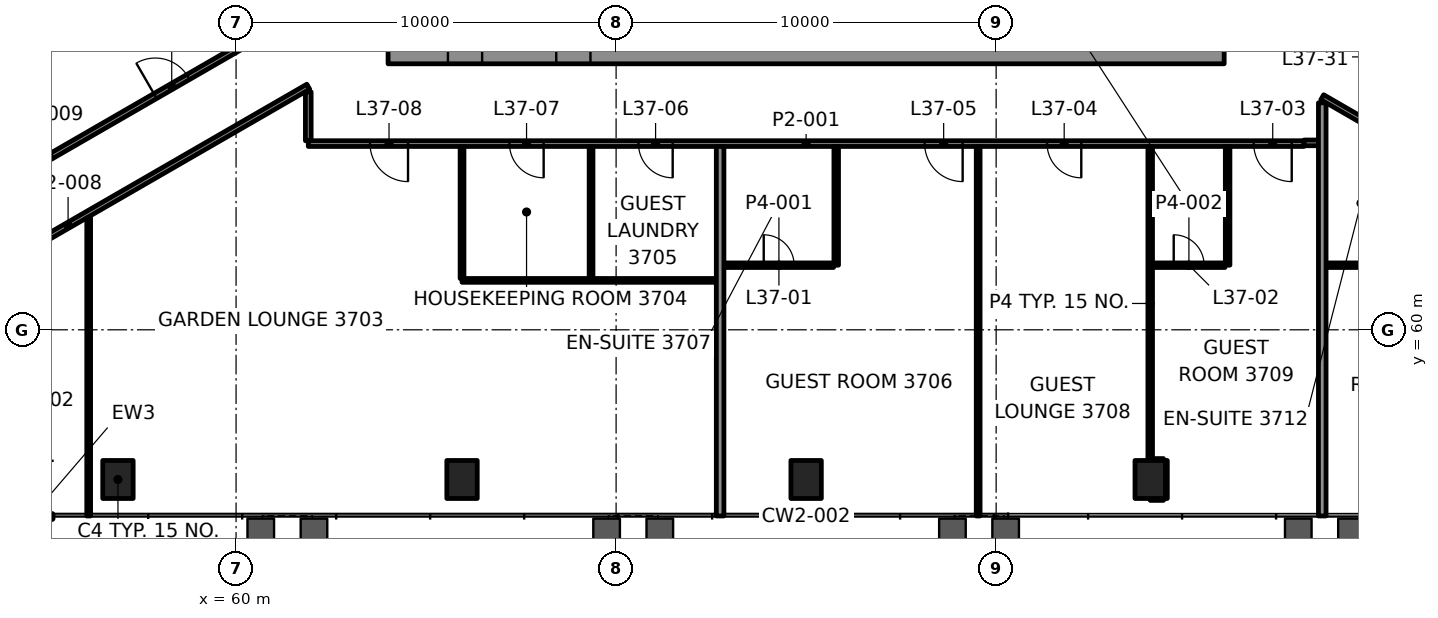
"""IFC4 building model, lengths in metres.
Left out: names, types, materials, properties, quantities, classifications, styles, units other than length and angle.
Written with IfcOpenShell. Run it as: python <this file> out.ifc"""

import sys

from ifc_helpers import new_model, si_unit, direction, frame, frame_2d, origin, origin_2d, place, context, subcontext, project, spatial, rectangle, hollow_rectangle, extrude, element, fill, save


model = new_model("IFC4")
c1 = context("Model", 3, precision=1e-05, world=origin(), true_north=direction((0.0, 1.0)))
c2 = subcontext(c1, "Body", "Model", "MODEL_VIEW")
j1 = project(units=[si_unit("LENGTHUNIT", "METRE"), si_unit("PLANEANGLEUNIT", "RADIAN")], contexts=[c1])
p1 = place(None, origin())
s1 = spatial("IfcSite", under=j1, at=p1, CompositionType="ELEMENT")
p2 = place(p1, origin())
s2 = spatial("IfcBuilding", under=s1, at=p2, CompositionType="ELEMENT")
p3 = place(p2, frame((0.0, 0.0, 163.6)))
s3 = spatial("IfcBuildingStorey", under=s2, at=p3, CompositionType="ELEMENT", Elevation=163.6)
for number, where, z_axis, x_axis in (
    (1, (56.892, 56.061, -0.0), (0.0, 0.0, 1.0), (1.0, 0.0, 0.0)),
    (2, (65.946, 56.061, -0.0), (0.0, 0.0, 1.0), (1.0, 0.0, 0.0)),
    (3, (75.0, 56.061, -0.0), (0.0, 0.0, 1.0), (1.0, 0.0, 0.0)),
    (4, (84.054, 56.061, -0.0), (0.0, 0.0, 1.0), (1.0, 0.0, 0.0)),
):
    element("IfcColumn", number, at=place(p3, frame(where, z_axis=z_axis, x_axis=x_axis)), inside=s3, PredefinedType="COLUMN", context=c2, shape_type="SweptSolid", body=[
        extrude(hollow_rectangle(XDim=0.8, YDim=1.0, WallThickness=0.05, at=origin_2d()), origin(), (0.0, 0.0, 1.0), 3.9),
    ])
p4 = place(p3, frame((64.0, 67.375, 0.0), z_axis=(0.0, 0.0, 1.0), x_axis=(1.0, 0.0, 0.0)))
e5 = element("IfcWall", 5, at=p4, inside=s3, PredefinedType="SHEAR", context=c2, shape_type="SweptSolid", body=[
    extrude(rectangle(XDim=22.0, YDim=0.75, at=frame_2d((11.0, 0.0))), origin(), (0.0, 0.0, 1.0), 3.7),
])
p5 = place(p4, frame((1.575, 0.0, 0.0)))
e6 = element("IfcOpeningElement", 6, at=p5, cuts=e5, PredefinedType="OPENING", context=c2, shape_type="SweptSolid", body=[
    extrude(rectangle(XDim=0.9, YDim=2.1, at=frame_2d((0.45, 1.05))), frame((0.0, 0.385, 0.0), z_axis=(0.0, -1.0, 0.0), x_axis=(1.0, 0.0, 0.0)), (0.0, 0.0, 1.0), 0.77),
])
p6 = place(p4, frame((4.425, 0.0, 0.0)))
e7 = element("IfcOpeningElement", 7, at=p6, cuts=e5, PredefinedType="OPENING", context=c2, shape_type="SweptSolid", body=[
    extrude(rectangle(XDim=0.9, YDim=2.1, at=frame_2d((0.45, 1.05))), frame((0.0, 0.385, 0.0), z_axis=(0.0, -1.0, 0.0), x_axis=(1.0, 0.0, 0.0)), (0.0, 0.0, 1.0), 0.77),
])
p7 = place(p3, frame((84.054, 55.561, 0.0), z_axis=(0.0, 0.0, 1.0), x_axis=(1.0, 0.0, 0.0)))
e8 = element("IfcWall", 8, at=p7, inside=s3, PredefinedType="PARTITIONING", context=c2, shape_type="SweptSolid", body=[
    extrude(rectangle(XDim=0.35, YDim=0.1, at=frame_2d((0.175, 0.0))), origin(), (0.0, 0.0, 1.0), 3.1),
])
p8 = place(p3, frame((84.114, 56.561, 0.0), z_axis=(0.0, 0.0, 1.0), x_axis=(1.0, 0.0, 0.0)))
e9 = element("IfcWall", 9, at=p8, inside=s3, PredefinedType="PARTITIONING", context=c2, shape_type="SweptSolid", body=[
    extrude(rectangle(XDim=0.29, YDim=0.1, at=frame_2d((0.145, 0.0))), origin(), (0.0, 0.0, 1.0), 3.1),
])
p9 = place(p3, frame((65.946, 61.3, 0.0), z_axis=(0.0, 0.0, 1.0), x_axis=(1.0, 0.0, 0.0)))
e10 = element("IfcWall", 10, at=p9, inside=s3, PredefinedType="PARTITIONING", context=c2, shape_type="SweptSolid", body=[
    extrude(rectangle(XDim=6.69, YDim=0.1, at=frame_2d((3.345, 0.0))), origin(), (0.0, 0.0, 1.0), 3.1),
])
p10 = place(p3, frame((72.846, 61.7, 0.0), z_axis=(0.0, 0.0, 1.0), x_axis=(1.0, 0.0, 0.0)))
e11 = element("IfcWall", 11, at=p10, inside=s3, PredefinedType="PARTITIONING", context=c2, shape_type="SweptSolid", body=[
    extrude(rectangle(XDim=2.876, YDim=0.12, at=frame_2d((1.438, 0.0))), origin(), (0.0, 0.0, 1.0), 3.1),
])
p11 = place(p10, frame((1.038, 0.0, 0.0)))
e12 = element("IfcOpeningElement", 12, at=p11, cuts=e11, PredefinedType="OPENING", context=c2, shape_type="SweptSolid", body=[
    extrude(rectangle(XDim=0.8, YDim=2.1, at=frame_2d((0.4, 1.05))), frame((0.0, 0.07, 0.0), z_axis=(0.0, -1.0, 0.0), x_axis=(1.0, 0.0, 0.0)), (0.0, 0.0, 1.0), 0.14),
])
p12 = place(p3, frame((84.124, 61.7, 0.0), z_axis=(0.0, 0.0, 1.0), x_axis=(1.0, 0.0, 0.0)))
e13 = element("IfcWall", 13, at=p12, inside=s3, PredefinedType="PARTITIONING", context=c2, shape_type="SweptSolid", body=[
    extrude(rectangle(XDim=1.897, YDim=0.12, at=frame_2d((0.949, 0.0))), origin(), (0.0, 0.0, 1.0), 3.1),
])
p13 = place(p12, frame((0.549, 0.0, 0.0)))
e14 = element("IfcOpeningElement", 14, at=p13, cuts=e13, PredefinedType="OPENING", context=c2, shape_type="SweptSolid", body=[
    extrude(rectangle(XDim=0.8, YDim=2.1, at=frame_2d((0.4, 1.05))), frame((0.0, 0.07, 0.0), z_axis=(0.0, -1.0, 0.0), x_axis=(1.0, 0.0, 0.0)), (0.0, 0.0, 1.0), 0.14),
])
p14 = place(p3, frame((88.691, 61.7, 0.0), z_axis=(0.0, 0.0, 1.0), x_axis=(1.0, 0.0, 0.0)))
e15 = element("IfcWall", 15, at=p14, inside=s3, PredefinedType="PARTITIONING", context=c2, shape_type="SweptSolid", body=[
    extrude(rectangle(XDim=1.145, YDim=0.12, at=frame_2d((0.573, 0.0))), origin(), (0.0, 0.0, 1.0), 3.1),
])
p15 = place(p3, frame((88.1, 64.9, 0.0), z_axis=(0.0, 0.0, 1.0), x_axis=(-1.0, 0.0, 0.0)))
e16 = element("IfcWall", 16, at=p15, inside=s3, PredefinedType="PARTITIONING", context=c2, shape_type="SweptSolid", body=[
    extrude(rectangle(XDim=26.199, YDim=0.15, at=frame_2d((13.1, 0.0))), origin(), (0.0, 0.0, 1.0), 3.1),
])
p16 = place(p15, frame((0.322, 0.0, 0.0)))
e17 = element("IfcOpeningElement", 17, at=p16, cuts=e16, PredefinedType="OPENING", context=c2, shape_type="SweptSolid", body=[
    extrude(rectangle(XDim=1.0, YDim=2.1, at=frame_2d((0.5, 1.05))), frame((0.0, 0.085, 0.0), z_axis=(0.0, -1.0, 0.0), x_axis=(1.0, 0.0, 0.0)), (0.0, 0.0, 1.0), 0.17),
])
p17 = place(p15, frame((5.859, 0.0, 0.0)))
e18 = element("IfcOpeningElement", 18, at=p17, cuts=e16, PredefinedType="OPENING", context=c2, shape_type="SweptSolid", body=[
    extrude(rectangle(XDim=0.9, YDim=2.1, at=frame_2d((0.45, 1.05))), frame((0.0, 0.085, 0.0), z_axis=(0.0, -1.0, 0.0), x_axis=(1.0, 0.0, 0.0)), (0.0, 0.0, 1.0), 0.17),
])
p18 = place(p15, frame((8.981, 0.0, 0.0)))
e19 = element("IfcOpeningElement", 19, at=p18, cuts=e16, PredefinedType="OPENING", context=c2, shape_type="SweptSolid", body=[
    extrude(rectangle(XDim=1.0, YDim=2.1, at=frame_2d((0.5, 1.05))), frame((0.0, 0.085, 0.0), z_axis=(0.0, -1.0, 0.0), x_axis=(1.0, 0.0, 0.0)), (0.0, 0.0, 1.0), 0.17),
])
p19 = place(p15, frame((16.611, 0.0, 0.0)))
e20 = element("IfcOpeningElement", 20, at=p19, cuts=e16, PredefinedType="OPENING", context=c2, shape_type="SweptSolid", body=[
    extrude(rectangle(XDim=0.9, YDim=2.1, at=frame_2d((0.45, 1.05))), frame((0.0, 0.085, 0.0), z_axis=(0.0, -1.0, 0.0), x_axis=(1.0, 0.0, 0.0)), (0.0, 0.0, 1.0), 0.17),
])
p20 = place(p15, frame((20.006, 0.0, 0.0)))
e21 = element("IfcOpeningElement", 21, at=p20, cuts=e16, PredefinedType="OPENING", context=c2, shape_type="SweptSolid", body=[
    extrude(rectangle(XDim=0.9, YDim=2.1, at=frame_2d((0.45, 1.05))), frame((0.0, 0.085, 0.0), z_axis=(0.0, -1.0, 0.0), x_axis=(1.0, 0.0, 0.0)), (0.0, 0.0, 1.0), 0.17),
])
p21 = place(p15, frame((23.575, 0.0, 0.0)))
e22 = element("IfcOpeningElement", 22, at=p21, cuts=e16, PredefinedType="OPENING", context=c2, shape_type="SweptSolid", body=[
    extrude(rectangle(XDim=1.0, YDim=2.1, at=frame_2d((0.5, 1.05))), frame((0.0, 0.085, 0.0), z_axis=(0.0, -1.0, 0.0), x_axis=(1.0, 0.0, 0.0)), (0.0, 0.0, 1.0), 0.17),
])
p22 = place(p3, frame((88.1, 64.919, 0.0), z_axis=(0.0, 0.0, 1.0), x_axis=(1.0, 0.0, 0.0)))
e23 = element("IfcWall", 23, at=p22, inside=s3, PredefinedType="PARTITIONING", context=c2, shape_type="SweptSolid", body=[
    extrude(rectangle(XDim=0.381, YDim=0.15, at=frame_2d((0.19, 0.0))), origin(), (0.0, 0.0, 1.0), 3.1),
])
p23 = place(p3, frame((61.9, 66.397, 0.0), z_axis=(0.0, 0.0, 1.0), x_axis=(-0.86603071172, -0.499990806274, 0.0)))
e24 = element("IfcWall", 24, at=p23, inside=s3, PredefinedType="PARTITIONING", context=c2, shape_type="SweptSolid", body=[
    extrude(rectangle(XDim=14.595, YDim=0.15, at=frame_2d((7.298, 0.0))), origin(), (0.0, 0.0, 1.0), 2.947),
])
p24 = place(p23, frame((10.032, 0.0, 0.0)))
e25 = element("IfcOpeningElement", 25, at=p24, cuts=e24, PredefinedType="OPENING", context=c2, shape_type="SweptSolid", body=[
    extrude(rectangle(XDim=1.0, YDim=2.1, at=frame_2d((0.5, 1.05))), frame((0.0, 0.085, 0.0), z_axis=(0.0, -1.0, 0.0), x_axis=(1.0, 0.0, 0.0)), (0.0, 0.0, 1.0), 0.17),
])
p25 = place(p3, frame((48.36, 60.659, 0.0), z_axis=(0.0, 0.0, 1.0), x_axis=(0.866033404619, 0.499986141892, 0.0)))
e26 = element("IfcWall", 26, at=p25, inside=s3, PredefinedType="PARTITIONING", context=c2, shape_type="SweptSolid", body=[
    extrude(rectangle(XDim=15.548, YDim=0.15, at=frame_2d((7.774, 0.0))), origin(), (0.0, 0.0, 1.0), 3.1),
])
p26 = place(p25, frame((3.415, 0.0, 0.0)))
e27 = element("IfcOpeningElement", 27, at=p26, cuts=e26, PredefinedType="OPENING", context=c2, shape_type="SweptSolid", body=[
    extrude(rectangle(XDim=1.0, YDim=2.1, at=frame_2d((0.5, 1.05))), frame((0.0, 0.085, 0.0), z_axis=(0.0, -1.0, 0.0), x_axis=(1.0, 0.0, 0.0)), (0.0, 0.0, 1.0), 0.17),
])
p27 = place(p25, frame((10.986, 0.0, 0.0)))
e28 = element("IfcOpeningElement", 28, at=p27, cuts=e26, PredefinedType="OPENING", context=c2, shape_type="SweptSolid", body=[
    extrude(rectangle(XDim=1.0, YDim=2.1, at=frame_2d((0.5, 1.05))), frame((0.0, 0.085, 0.0), z_axis=(0.0, -1.0, 0.0), x_axis=(1.0, 0.0, 0.0)), (0.0, 0.0, 1.0), 0.17),
])
p28 = place(p3, frame((88.581, 55.101, 0.0), z_axis=(0.0, 0.0, 1.0), x_axis=(0.0, 1.0, 0.0)))
e29 = element("IfcWall", 29, at=p28, inside=s3, PredefinedType="PARTITIONING", context=c2, shape_type="SweptSolid", body=[
    extrude(rectangle(XDim=10.872, YDim=0.2, at=frame_2d((5.436, 0.0))), origin(), (0.0, 0.0, 1.0), 2.865),
])
p29 = place(p3, frame((86.091, 61.7, 0.0), z_axis=(0.0, 0.0, 1.0), x_axis=(0.0, 1.0, 0.0)))
e30 = element("IfcWall", 30, at=p29, inside=s3, PredefinedType="PARTITIONING", context=c2, shape_type="SweptSolid", body=[
    extrude(rectangle(XDim=3.125, YDim=0.12, at=frame_2d((1.562, 0.0))), origin(), (0.0, 0.0, 1.0), 3.1),
])
p30 = place(p3, frame((84.454, 55.562, 0.0), z_axis=(0.0, 0.0, 1.0), x_axis=(0.0, 1.0, 0.0)))
e31 = element("IfcWall", 31, at=p30, inside=s3, PredefinedType="PARTITIONING", context=c2, shape_type="SweptSolid", body=[
    extrude(rectangle(XDim=0.999, YDim=0.1, at=frame_2d((0.5, 0.0))), origin(), (0.0, 0.0, 1.0), 2.865),
])
p31 = place(p3, frame((84.054, 56.561, 0.0), z_axis=(0.0, 0.0, 1.0), x_axis=(0.0, 1.0, 0.0)))
e32 = element("IfcWall", 32, at=p31, inside=s3, PredefinedType="PARTITIONING", context=c2, shape_type="SweptSolid", body=[
    extrude(rectangle(XDim=8.264, YDim=0.12, at=frame_2d((4.132, 0.0))), origin(), (0.0, 0.0, 1.0), 3.1),
])
p32 = place(p3, frame((79.527, 55.101, 0.0), z_axis=(0.0, 0.0, 1.0), x_axis=(0.0, 1.0, 0.0)))
e33 = element("IfcWall", 33, at=p32, inside=s3, PredefinedType="PARTITIONING", context=c2, shape_type="SweptSolid", body=[
    extrude(rectangle(XDim=9.724, YDim=0.1, at=frame_2d((4.862, 0.0))), origin(), (0.0, 0.0, 1.0), 2.865),
])
p33 = place(p3, frame((75.792, 61.7, 0.0), z_axis=(0.0, 0.0, 1.0), x_axis=(0.0, 1.0, 0.0)))
e34 = element("IfcWall", 34, at=p33, inside=s3, PredefinedType="PARTITIONING", context=c2, shape_type="SweptSolid", body=[
    extrude(rectangle(XDim=3.125, YDim=0.12, at=frame_2d((1.562, 0.0))), origin(), (0.0, 0.0, 1.0), 3.1),
])
p34 = place(p3, frame((72.737, 55.101, 0.0), z_axis=(0.0, 0.0, 1.0), x_axis=(0.0, 1.0, 0.0)))
e35 = element("IfcWall", 35, at=p34, inside=s3, PredefinedType="PARTITIONING", context=c2, shape_type="SweptSolid", body=[
    extrude(rectangle(XDim=9.724, YDim=0.2, at=frame_2d((4.862, 0.0))), origin(), (0.0, 0.0, 1.0), 2.865),
])
for number, where, z_axis, x_axis in (
    (36, (69.341, 61.35, 0.0), (0.0, 0.0, 1.0), (0.0, 1.0, 0.0)),
    (37, (65.946, 61.35, 0.0), (0.0, 0.0, 1.0), (0.0, 1.0, 0.0)),
):
    element("IfcWall", number, at=place(p3, frame(where, z_axis=z_axis, x_axis=x_axis)), inside=s3, PredefinedType="PARTITIONING", context=c2, shape_type="SweptSolid", body=[
        extrude(rectangle(XDim=3.475, YDim=0.1, at=frame_2d((1.737, 0.0))), origin(), (0.0, 0.0, 1.0), 3.1),
    ])
p35 = place(p3, frame((61.9, 64.976, 0.0), z_axis=(0.0, 0.0, 1.0), x_axis=(0.0, 1.0, 0.0)))
e38 = element("IfcWall", 38, at=p35, inside=s3, PredefinedType="PARTITIONING", context=c2, shape_type="SweptSolid", body=[
    extrude(rectangle(XDim=1.285, YDim=0.15, at=frame_2d((0.643, 0.0))), origin(), (0.0, 0.0, 1.0), 2.947),
])
p36 = place(p3, frame((56.122, 55.101, 0.0), z_axis=(0.0, 0.0, 1.0), x_axis=(0.0, 1.0, 0.0)))
e39 = element("IfcWall", 39, at=p36, inside=s3, PredefinedType="PARTITIONING", context=c2, shape_type="SweptSolid", body=[
    extrude(rectangle(XDim=7.844, YDim=0.1, at=frame_2d((3.922, 0.0))), origin(), (0.0, 0.0, 1.0), 3.1),
])
p37 = place(p3, frame((88.175, 68.433, 0.0), z_axis=(0.0, 0.0, 1.0), x_axis=(0.866030530892, -0.499991119485, 0.0)))
e40 = element("IfcWall", 40, at=p37, inside=s3, PredefinedType="PARTITIONING", context=c2, shape_type="SweptSolid", body=[
    extrude(rectangle(XDim=15.549, YDim=0.15, at=frame_2d((7.774, 0.0))), origin(), (0.0, 0.0, 1.0), 3.1),
])
p38 = place(p37, frame((2.003, 0.0, 0.0)))
e41 = element("IfcOpeningElement", 41, at=p38, cuts=e40, PredefinedType="OPENING", context=c2, shape_type="SweptSolid", body=[
    extrude(rectangle(XDim=1.0, YDim=2.1, at=frame_2d((0.5, 1.05))), frame((0.0, 0.085, 0.0), z_axis=(0.0, -1.0, 0.0), x_axis=(1.0, 0.0, 0.0)), (0.0, 0.0, 1.0), 0.17),
])
p39 = place(p37, frame((10.096, 0.0, 0.0)))
e42 = element("IfcOpeningElement", 42, at=p39, cuts=e40, PredefinedType="OPENING", context=c2, shape_type="SweptSolid", body=[
    extrude(rectangle(XDim=1.0, YDim=2.1, at=frame_2d((0.5, 1.05))), frame((0.0, 0.085, 0.0), z_axis=(0.0, -1.0, 0.0), x_axis=(1.0, 0.0, 0.0)), (0.0, 0.0, 1.0), 0.17),
])
p40 = place(p3, frame((100.74, 59.1, 0.0), z_axis=(0.0, 0.0, 1.0), x_axis=(-0.866028060244, 0.499995398849, 0.0)))
e43 = element("IfcWall", 43, at=p40, inside=s3, PredefinedType="PARTITIONING", context=c2, shape_type="SweptSolid", body=[
    extrude(rectangle(XDim=14.04, YDim=0.15, at=frame_2d((7.02, 0.0))), origin(), (0.0, 0.0, 1.0), 2.947),
])
p41 = place(p40, frame((1.994, 0.0, 0.0)))
e44 = element("IfcOpeningElement", 44, at=p41, cuts=e43, PredefinedType="OPENING", context=c2, shape_type="SweptSolid", body=[
    extrude(rectangle(XDim=1.0, YDim=2.1, at=frame_2d((0.5, 1.05))), frame((0.0, 0.085, 0.0), z_axis=(0.0, -1.0, 0.0), x_axis=(1.0, 0.0, 0.0)), (0.0, 0.0, 1.0), 0.17),
])
p42 = place(p40, frame((10.409, 0.0, 0.0)))
e45 = element("IfcOpeningElement", 45, at=p42, cuts=e43, PredefinedType="OPENING", context=c2, shape_type="SweptSolid", body=[
    extrude(rectangle(XDim=1.0, YDim=2.1, at=frame_2d((0.5, 1.05))), frame((0.0, 0.085, 0.0), z_axis=(0.0, -1.0, 0.0), x_axis=(1.0, 0.0, 0.0)), (0.0, 0.0, 1.0), 0.17),
])
p43 = place(p11, origin())
e46 = element("IfcDoor", 46, at=p43, inside=s3, OperationType="SINGLE_SWING_RIGHT", PredefinedType="DOOR", context=c2, shape_type="SweptSolid", body=[
    extrude(rectangle(XDim=0.8, YDim=2.1, at=frame_2d((0.4, 1.05))), frame((0.0, 0.025, 0.0), z_axis=(0.0, -1.0, 0.0), x_axis=(1.0, 0.0, 0.0)), (0.0, 0.0, 1.0), 0.05),
])
fill(e12, e46)
p44 = place(p13, origin())
e47 = element("IfcDoor", 47, at=p44, inside=s3, OperationType="SINGLE_SWING_LEFT", PredefinedType="DOOR", context=c2, shape_type="SweptSolid", body=[
    extrude(rectangle(XDim=0.8, YDim=2.1, at=frame_2d((0.4, 1.05))), frame((0.0, 0.025, 0.0), z_axis=(0.0, -1.0, 0.0), x_axis=(1.0, 0.0, 0.0)), (0.0, 0.0, 1.0), 0.05),
])
fill(e14, e47)
p45 = place(p16, origin())
e48 = element("IfcDoor", 48, at=p45, inside=s3, OperationType="SINGLE_SWING_LEFT", PredefinedType="DOOR", context=c2, shape_type="SweptSolid", body=[
    extrude(rectangle(XDim=1.0, YDim=2.1, at=frame_2d((0.5, 1.05))), frame((0.0, 0.025, 0.0), z_axis=(0.0, -1.0, 0.0), x_axis=(1.0, 0.0, 0.0)), (0.0, 0.0, 1.0), 0.05),
])
fill(e17, e48)
p46 = place(p17, origin())
e49 = element("IfcDoor", 49, at=p46, inside=s3, OperationType="SINGLE_SWING_RIGHT", PredefinedType="DOOR", context=c2, shape_type="SweptSolid", body=[
    extrude(rectangle(XDim=0.9, YDim=2.1, at=frame_2d((0.45, 1.05))), frame((0.0, 0.025, 0.0), z_axis=(0.0, -1.0, 0.0), x_axis=(1.0, 0.0, 0.0)), (0.0, 0.0, 1.0), 0.05),
])
fill(e18, e49)
p47 = place(p18, origin())
e50 = element("IfcDoor", 50, at=p47, inside=s3, OperationType="SINGLE_SWING_RIGHT", PredefinedType="DOOR", context=c2, shape_type="SweptSolid", body=[
    extrude(rectangle(XDim=1.0, YDim=2.1, at=frame_2d((0.5, 1.05))), frame((0.0, 0.025, 0.0), z_axis=(0.0, -1.0, 0.0), x_axis=(1.0, 0.0, 0.0)), (0.0, 0.0, 1.0), 0.05),
])
fill(e19, e50)
p48 = place(p19, origin())
e51 = element("IfcDoor", 51, at=p48, inside=s3, OperationType="SINGLE_SWING_LEFT", PredefinedType="DOOR", context=c2, shape_type="SweptSolid", body=[
    extrude(rectangle(XDim=0.9, YDim=2.1, at=frame_2d((0.45, 1.05))), frame((0.0, 0.025, 0.0), z_axis=(0.0, -1.0, 0.0), x_axis=(1.0, 0.0, 0.0)), (0.0, 0.0, 1.0), 0.05),
])
fill(e20, e51)
p49 = place(p20, origin())
e52 = element("IfcDoor", 52, at=p49, inside=s3, OperationType="SINGLE_SWING_RIGHT", PredefinedType="DOOR", context=c2, shape_type="SweptSolid", body=[
    extrude(rectangle(XDim=0.9, YDim=2.1, at=frame_2d((0.45, 1.05))), frame((0.0, 0.025, 0.0), z_axis=(0.0, -1.0, 0.0), x_axis=(1.0, 0.0, 0.0)), (0.0, 0.0, 1.0), 0.05),
])
fill(e21, e52)
p50 = place(p21, origin())
e53 = element("IfcDoor", 53, at=p50, inside=s3, OperationType="SINGLE_SWING_LEFT", PredefinedType="DOOR", context=c2, shape_type="SweptSolid", body=[
    extrude(rectangle(XDim=1.0, YDim=2.1, at=frame_2d((0.5, 1.05))), frame((0.0, 0.025, 0.0), z_axis=(0.0, -1.0, 0.0), x_axis=(1.0, 0.0, 0.0)), (0.0, 0.0, 1.0), 0.05),
])
fill(e22, e53)
p51 = place(p27, origin())
e54 = element("IfcDoor", 54, at=p51, inside=s3, OperationType="SINGLE_SWING_LEFT", PredefinedType="DOOR", context=c2, shape_type="SweptSolid", body=[
    extrude(rectangle(XDim=1.0, YDim=2.1, at=frame_2d((0.5, 1.05))), frame((0.0, 0.025, 0.0), z_axis=(0.0, -1.0, 0.0), x_axis=(1.0, 0.0, 0.0)), (0.0, 0.0, 1.0), 0.05),
])
fill(e28, e54)
p52 = place(p5, origin())
e55 = element("IfcDoor", 55, at=p52, inside=s3, OperationType="SINGLE_SWING_LEFT", PredefinedType="DOOR", context=c2, shape_type="SweptSolid", body=[
    extrude(rectangle(XDim=0.9, YDim=2.1, at=frame_2d((0.45, 1.05))), frame((0.0, 0.095, 0.0), z_axis=(0.0, -1.0, 0.0), x_axis=(1.0, 0.0, 0.0)), (0.0, 0.0, 1.0), 0.19),
])
fill(e6, e55)
p53 = place(p6, origin())
e56 = element("IfcDoor", 56, at=p53, inside=s3, OperationType="SINGLE_SWING_LEFT", PredefinedType="DOOR", context=c2, shape_type="SweptSolid", body=[
    extrude(rectangle(XDim=0.9, YDim=2.1, at=frame_2d((0.45, 1.05))), frame((0.0, 0.095, 0.0), z_axis=(0.0, -1.0, 0.0), x_axis=(1.0, 0.0, 0.0)), (0.0, 0.0, 1.0), 0.19),
])
fill(e7, e56)
save(model, sys.argv[1])
